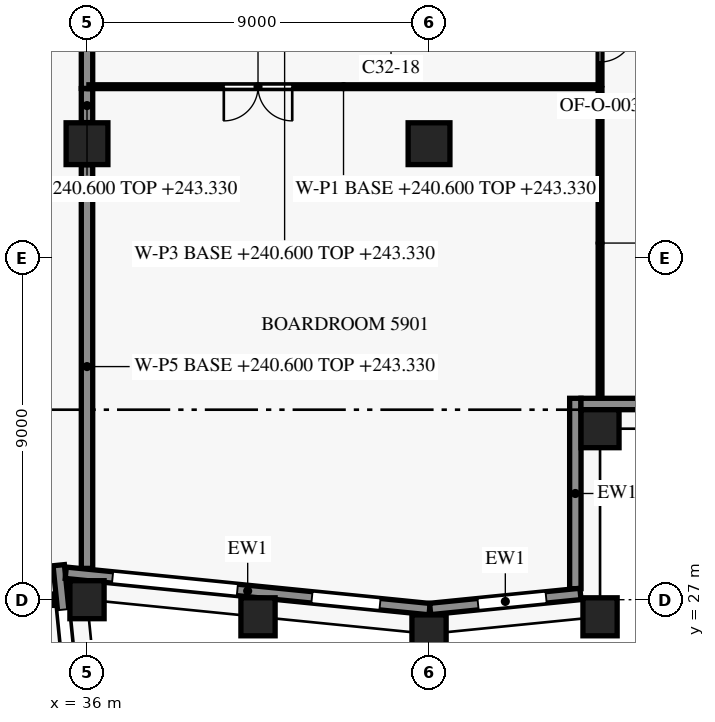
"""IFC4 building model, lengths in metres.
Left out: names, types, materials, properties, quantities, classifications, styles, units other than length and angle.
Written with IfcOpenShell. Run it as: python <this file> out.ifc"""

import sys

from ifc_helpers import new_model, si_unit, direction, frame, frame_2d, origin, origin_2d, place, context, subcontext, project, spatial, rectangle, extrude, element, fill, save


model = new_model("IFC4")
c1 = context("Model", 3, precision=1e-05, world=origin(), true_north=direction((0.0, 1.0)))
c2 = subcontext(c1, "Body", "Model", "MODEL_VIEW")
j1 = project(units=[si_unit("LENGTHUNIT", "METRE"), si_unit("PLANEANGLEUNIT", "RADIAN")], contexts=[c1])
p1 = place(None, origin())
s1 = spatial("IfcSite", under=j1, at=p1, CompositionType="ELEMENT")
p2 = place(p1, origin())
s2 = spatial("IfcBuilding", under=s1, at=p2, CompositionType="ELEMENT")
p3 = place(p2, frame((0.0, 0.0, 240.6)))
s3 = spatial("IfcBuildingStorey", under=s2, at=p3, CompositionType="ELEMENT", Elevation=240.6)
for number, where, z_axis, x_axis in (
    (1, (36.0, 27.0, 0.0), (0.0, 0.0, 1.0), (-0.1, 0.995, 0.0)),
    (2, (40.5, 26.55, 0.0), (0.0, 0.0, 1.0), (0.995, -0.1, 0.0)),
    (3, (45.0, 26.1, 0.0), (0.0, 0.0, 1.0), (1.0, 0.0, 0.0)),
    (4, (49.5, 26.55, 0.0), (0.0, 0.0, 1.0), (0.995, 0.1, 0.0)),
):
    element("IfcColumn", number, at=place(p3, frame(where, z_axis=z_axis, x_axis=x_axis)), inside=s3, PredefinedType="COLUMN", context=c2, shape_type="SweptSolid", body=[
        extrude(rectangle(XDim=0.9, YDim=1.0, at=origin_2d()), origin(), (0.0, 0.0, 1.0), 3.8),
    ])
p4 = place(p3, frame((49.5, 31.5, 0.0), z_axis=(0.0, 0.0, 1.0), x_axis=(1.0, 0.0, 0.0)))
e5 = element("IfcColumn", 5, at=p4, inside=s3, PredefinedType="COLUMN", context=c2, shape_type="SweptSolid", body=[
    extrude(rectangle(XDim=1.0, YDim=1.0, at=origin_2d()), origin(), (0.0, 0.0, 1.0), 3.8),
])
for number, where, z_axis, x_axis in (
    (6, (36.0, 39.0, 0.0), (0.0, 0.0, 1.0), (1.0, 0.0, 0.0)),
    (7, (45.0, 39.0, 0.0), (0.0, 0.0, 1.0), (1.0, 0.0, 0.0)),
):
    element("IfcColumn", number, at=place(p3, frame(where, z_axis=z_axis, x_axis=x_axis)), inside=s3, PredefinedType="COLUMN", context=c2, shape_type="SweptSolid", body=[
        extrude(rectangle(XDim=1.1, YDim=1.1, at=origin_2d()), origin(), (0.0, 0.0, 1.0), 3.8),
    ])
p5 = place(p3, frame((35.256, 27.908, 0.0), z_axis=(0.0, 0.0, 1.0), x_axis=(0.099535070904, -0.995034054523, 0.0)))
e8 = element("IfcWall", 8, at=p5, inside=s3, PredefinedType="SOLIDWALL", context=c2, shape_type="SweptSolid", body=[
    extrude(rectangle(XDim=4.626, YDim=0.3, at=frame_2d((2.313, 0.0))), origin(), (0.0, 0.0, 1.0), 3.15),
])
p6 = place(p5, frame((1.176, 0.0, 0.15)))
e9 = element("IfcOpeningElement", 9, at=p6, cuts=e8, PredefinedType="OPENING", context=c2, shape_type="SweptSolid", body=[
    extrude(rectangle(XDim=3.3, YDim=2.4, at=frame_2d((1.65, 1.2))), frame((0.0, 0.16, 0.0), z_axis=(0.0, -1.0, 0.0), x_axis=(1.0, 0.0, 0.0)), (0.0, 0.0, 1.0), 0.32),
])
p7 = place(p3, frame((45.015, 26.752, 0.0), z_axis=(0.0, 0.0, 1.0), x_axis=(-0.9950379439, 0.099496181828, 0.0)))
e10 = element("IfcWall", 10, at=p7, inside=s3, PredefinedType="SOLIDWALL", context=c2, shape_type="SweptSolid", body=[
    extrude(rectangle(XDim=9.621, YDim=0.3, at=frame_2d((4.811, 0.0))), origin(), (0.0, 0.0, 1.0), 3.15),
])
p8 = place(p7, frame((1.311, 0.0, 0.75)))
e11 = element("IfcOpeningElement", 11, at=p8, cuts=e10, PredefinedType="OPENING", context=c2, shape_type="SweptSolid", body=[
    extrude(rectangle(XDim=1.8, YDim=1.8, at=frame_2d((0.9, 0.9))), frame((0.0, 0.16, 0.0), z_axis=(0.0, -1.0, 0.0), x_axis=(1.0, 0.0, 0.0)), (0.0, 0.0, 1.0), 0.32),
])
p9 = place(p7, frame((5.083, 0.0, 0.15)))
e12 = element("IfcOpeningElement", 12, at=p9, cuts=e10, PredefinedType="OPENING", context=c2, shape_type="SweptSolid", body=[
    extrude(rectangle(XDim=3.3, YDim=2.4, at=frame_2d((1.65, 1.2))), frame((0.0, 0.16, 0.0), z_axis=(0.0, -1.0, 0.0), x_axis=(1.0, 0.0, 0.0)), (0.0, 0.0, 1.0), 0.32),
])
p10 = place(p3, frame((48.985, 27.152, 0.0), z_axis=(0.0, 0.0, 1.0), x_axis=(-0.995037798293, -0.099497638, 0.0)))
e13 = element("IfcWall", 13, at=p10, inside=s3, PredefinedType="SOLIDWALL", context=c2, shape_type="SweptSolid", body=[
    extrude(rectangle(XDim=3.975, YDim=0.3, at=frame_2d((1.988, 0.0))), origin(), (0.0, 0.0, 1.0), 3.15),
])
p11 = place(p10, frame((0.909, 0.0, 0.75)))
e14 = element("IfcOpeningElement", 14, at=p11, cuts=e13, PredefinedType="OPENING", context=c2, shape_type="SweptSolid", body=[
    extrude(rectangle(XDim=1.8, YDim=1.8, at=frame_2d((0.9, 0.9))), frame((0.0, 0.16, 0.0), z_axis=(0.0, -1.0, 0.0), x_axis=(1.0, 0.0, 0.0)), (0.0, 0.0, 1.0), 0.32),
])
p12 = place(p3, frame((48.85, 32.3, 0.0), z_axis=(0.0, 0.0, 1.0), x_axis=(0.0, -1.0, 0.0)))
e15 = element("IfcWall", 15, at=p12, inside=s3, PredefinedType="SOLIDWALL", context=c2, shape_type="SweptSolid", body=[
    extrude(rectangle(XDim=5.01, YDim=0.3, at=frame_2d((2.505, 0.0))), origin(), (0.0, 0.0, 1.0), 3.15),
])
p13 = place(p3, frame((53.5, 32.15, 0.0), z_axis=(0.0, 0.0, 1.0), x_axis=(-1.0, 0.0, 0.0)))
e16 = element("IfcWall", 16, at=p13, inside=s3, PredefinedType="SOLIDWALL", context=c2, shape_type="SweptSolid", body=[
    extrude(rectangle(XDim=4.502, YDim=0.3, at=frame_2d((2.251, 0.0))), origin(), (0.0, 0.0, 1.0), 3.15),
])
p14 = place(p3, frame((24.555, 27.0, 0.0), z_axis=(0.0, 0.0, 1.0), x_axis=(1.0, 0.0, 0.0)))
e17 = element("IfcWall", 17, at=p14, inside=s3, PredefinedType="PARTITIONING", context=c2, shape_type="SweptSolid", body=[
    extrude(rectangle(XDim=10.591, YDim=0.3, at=frame_2d((5.295, 0.0))), origin(), (0.0, 0.0, 1.0), 2.73),
])
p15 = place(p3, frame((36.0, 27.824, 0.0), z_axis=(0.0, 0.0, 1.0), x_axis=(0.0, 1.0, 0.0)))
e18 = element("IfcWall", 18, at=p15, inside=s3, PredefinedType="PARTITIONING", context=c2, shape_type="SweptSolid", body=[
    extrude(rectangle(XDim=10.621, YDim=0.3, at=frame_2d((5.311, 0.0))), origin(), (0.0, 0.0, 1.0), 2.73),
])
p16 = place(p3, frame((49.5, 32.32, 0.0), z_axis=(0.0, 0.0, 1.0), x_axis=(0.0, 1.0, 0.0)))
e19 = element("IfcWall", 19, at=p16, inside=s3, PredefinedType="PARTITIONING", context=c2, shape_type="SweptSolid", body=[
    extrude(rectangle(XDim=8.13, YDim=0.1, at=frame_2d((4.065, 0.0))), origin(), (0.0, 0.0, 1.0), 2.73),
])
p17 = place(p3, frame((36.0, 39.555, 0.0), z_axis=(0.0, 0.0, 1.0), x_axis=(0.0, 1.0, 0.0)))
e20 = element("IfcWall", 20, at=p17, inside=s3, PredefinedType="PARTITIONING", context=c2, shape_type="SweptSolid", body=[
    extrude(rectangle(XDim=0.895, YDim=0.3, at=frame_2d((0.448, 0.0))), origin(), (0.0, 0.0, 1.0), 2.73),
])
p18 = place(p3, frame((49.45, 40.5, 0.0), z_axis=(0.0, 0.0, 1.0), x_axis=(-1.0, 0.0, 0.0)))
e21 = element("IfcWall", 21, at=p18, inside=s3, PredefinedType="PARTITIONING", context=c2, shape_type="SweptSolid", body=[
    extrude(rectangle(XDim=13.4, YDim=0.1, at=frame_2d((6.7, 0.0))), origin(), (0.0, 0.0, 1.0), 2.73),
])
p19 = place(p18, frame((8.05, 0.0, 0.0)))
e22 = element("IfcOpeningElement", 22, at=p19, cuts=e21, PredefinedType="OPENING", context=c2, shape_type="SweptSolid", body=[
    extrude(rectangle(XDim=1.8, YDim=2.1, at=frame_2d((0.9, 1.05))), frame((0.0, 0.06, 0.0), z_axis=(0.0, -1.0, 0.0), x_axis=(1.0, 0.0, 0.0)), (0.0, 0.0, 1.0), 0.12),
])
p20 = place(p3, frame((36.0, 40.455, 0.0), z_axis=(0.0, 0.0, 1.0), x_axis=(0.0, 1.0, 0.0)))
e23 = element("IfcWall", 23, at=p20, inside=s3, PredefinedType="PARTITIONING", context=c2, shape_type="SweptSolid", body=[
    extrude(rectangle(XDim=4.485, YDim=0.3, at=frame_2d((2.242, 0.0))), origin(), (0.0, 0.0, 1.0), 2.73),
])
p21 = place(p3, frame((49.5, 42.9, 0.0), z_axis=(0.0, 0.0, 1.0), x_axis=(0.0, -1.0, 0.0)))
e24 = element("IfcWall", 24, at=p21, inside=s3, PredefinedType="PARTITIONING", context=c2, shape_type="SweptSolid", body=[
    extrude(rectangle(XDim=2.35, YDim=0.1, at=frame_2d((1.175, 0.0))), origin(), (0.0, 0.0, 1.0), 2.73),
])
p22 = place(p21, frame((0.85, 0.0, 0.0)))
e25 = element("IfcOpeningElement", 25, at=p22, cuts=e24, PredefinedType="OPENING", context=c2, shape_type="SweptSolid", body=[
    extrude(rectangle(XDim=0.9, YDim=2.1, at=frame_2d((0.45, 1.05))), frame((0.0, 0.06, 0.0), z_axis=(0.0, -1.0, 0.0), x_axis=(1.0, 0.0, 0.0)), (0.0, 0.0, 1.0), 0.12),
])
p23 = place(p6, origin())
e26 = element("IfcWindow", 26, at=p23, inside=s3, PartitioningType="SINGLE_PANEL", PredefinedType="WINDOW", context=c2, shape_type="SweptSolid", body=[
    extrude(rectangle(XDim=3.3, YDim=2.4, at=frame_2d((1.65, 1.2))), frame((0.0, 0.03, 0.0), z_axis=(0.0, -1.0, 0.0), x_axis=(1.0, 0.0, 0.0)), (0.0, 0.0, 1.0), 0.06),
])
fill(e9, e26)
p24 = place(p8, origin())
e27 = element("IfcWindow", 27, at=p24, inside=s3, PartitioningType="SINGLE_PANEL", PredefinedType="WINDOW", context=c2, shape_type="SweptSolid", body=[
    extrude(rectangle(XDim=1.8, YDim=1.8, at=frame_2d((0.9, 0.9))), frame((0.0, 0.03, 0.0), z_axis=(0.0, -1.0, 0.0), x_axis=(1.0, 0.0, 0.0)), (0.0, 0.0, 1.0), 0.06),
])
fill(e11, e27)
p25 = place(p9, origin())
e28 = element("IfcWindow", 28, at=p25, inside=s3, PartitioningType="SINGLE_PANEL", PredefinedType="WINDOW", context=c2, shape_type="SweptSolid", body=[
    extrude(rectangle(XDim=3.3, YDim=2.4, at=frame_2d((1.65, 1.2))), frame((0.0, 0.03, 0.0), z_axis=(0.0, -1.0, 0.0), x_axis=(1.0, 0.0, 0.0)), (0.0, 0.0, 1.0), 0.06),
])
fill(e12, e28)
p26 = place(p11, origin())
e29 = element("IfcWindow", 29, at=p26, inside=s3, PartitioningType="SINGLE_PANEL", PredefinedType="WINDOW", context=c2, shape_type="SweptSolid", body=[
    extrude(rectangle(XDim=1.8, YDim=1.8, at=frame_2d((0.9, 0.9))), frame((0.0, 0.03, 0.0), z_axis=(0.0, -1.0, 0.0), x_axis=(1.0, 0.0, 0.0)), (0.0, 0.0, 1.0), 0.06),
])
fill(e14, e29)
p27 = place(p22, origin())
e30 = element("IfcDoor", 30, at=p27, inside=s3, OperationType="SINGLE_SWING_LEFT", PredefinedType="DOOR", context=c2, shape_type="SweptSolid", body=[
    extrude(rectangle(XDim=0.9, YDim=2.1, at=frame_2d((0.45, 1.05))), frame((0.0, 0.025, 0.0), z_axis=(0.0, -1.0, 0.0), x_axis=(1.0, 0.0, 0.0)), (0.0, 0.0, 1.0), 0.05),
])
fill(e25, e30)
p28 = place(p19, origin())
e31 = element("IfcDoor", 31, at=p28, inside=s3, OperationType="DOUBLE_DOOR_SINGLE_SWING", PredefinedType="DOOR", context=c2, shape_type="SweptSolid", body=[
    extrude(rectangle(XDim=1.8, YDim=2.1, at=frame_2d((0.9, 1.05))), frame((0.0, 0.025, 0.0), z_axis=(0.0, -1.0, 0.0), x_axis=(1.0, 0.0, 0.0)), (0.0, 0.0, 1.0), 0.05),
])
fill(e22, e31)
save(model, sys.argv[1])
